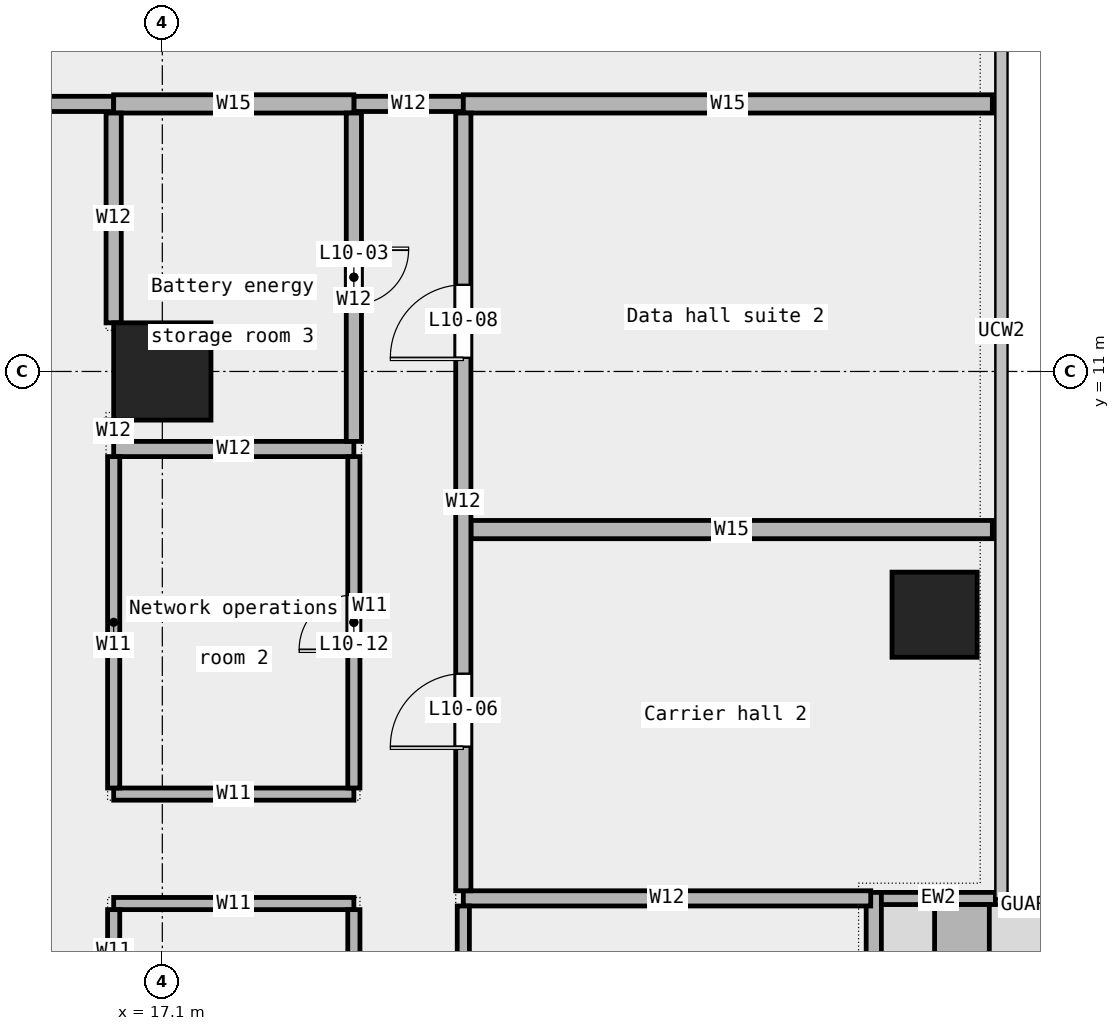
"""IFC4 building model, lengths in metres.
Left out: names, types, materials, properties, quantities, classifications, styles, units other than length and angle.
Written with IfcOpenShell. Run it as: python <this file> out.ifc"""

import sys

from ifc_helpers import new_model, si_unit, direction, frame, frame_2d, origin, origin_2d, place, context, subcontext, project, spatial, rectangle, extrude, element, fill, save


model = new_model("IFC4")
c1 = context("Model", 3, precision=1e-05, world=origin(), true_north=direction((0.0, 1.0)))
c2 = subcontext(c1, "Body", "Model", "MODEL_VIEW")
j1 = project(units=[si_unit("LENGTHUNIT", "METRE"), si_unit("PLANEANGLEUNIT", "RADIAN")], contexts=[c1])
p1 = place(None, origin())
s1 = spatial("IfcSite", under=j1, at=p1, CompositionType="ELEMENT")
p2 = place(p1, origin())
s2 = spatial("IfcBuilding", under=s1, at=p2, CompositionType="ELEMENT")
p3 = place(p2, frame((0.0, 0.0, 55.0)))
s3 = spatial("IfcBuildingStorey", under=s2, at=p3, CompositionType="ELEMENT", Elevation=55.0)
p4 = place(p3, frame((29.8, 7.0, 0.0), z_axis=(0.0, 0.0, 1.0), x_axis=(1.0, 0.0, 0.0)))
e1 = element("IfcColumn", 1, at=p4, inside=s3, PredefinedType="COLUMN", context=c2, shape_type="SweptSolid", body=[
    extrude(rectangle(XDim=1.4, YDim=1.4, at=origin_2d()), origin(), (0.0, 0.0, 1.0), 4.35),
])
p5 = place(p3, frame((17.1, 11.0, 0.0), z_axis=(0.0, 0.0, 1.0), x_axis=(1.0, 0.0, 0.0)))
e2 = element("IfcColumn", 2, at=p5, inside=s3, PredefinedType="COLUMN", context=c2, shape_type="SweptSolid", body=[
    extrude(rectangle(XDim=1.6, YDim=1.6, at=origin_2d()), origin(), (0.0, 0.0, 1.0), 4.35),
])
p6 = place(p3, frame((28.8, -11.767, 0.0), z_axis=(0.0, 0.0, 1.0), x_axis=(0.0, 1.0, 0.0)))
e3 = element("IfcWall", 3, at=p6, inside=s3, PredefinedType="STANDARD", context=c2, shape_type="SweptSolid", body=[
    extrude(rectangle(XDim=14.2, YDim=0.25, at=frame_2d((7.1, 0.0))), origin(), (0.0, 0.0, 1.0), 4.35),
])
p7 = place(p6, frame((1.75, 0.0, 0.45)))
e4 = element("IfcOpeningElement", 4, at=p7, cuts=e3, PredefinedType="OPENING", context=c2, shape_type="SweptSolid", body=[
    extrude(rectangle(XDim=1.5, YDim=3.0, at=frame_2d((0.75, 1.5))), frame((0.0, 0.137, 0.0), z_axis=(0.0, -1.0, 0.0), x_axis=(1.0, 0.0, 0.0)), (0.0, 0.0, 1.0), 0.274),
])
p8 = place(p6, frame((6.25, 0.0, 0.0)))
e5 = element("IfcOpeningElement", 5, at=p8, cuts=e3, PredefinedType="OPENING", context=c2, shape_type="SweptSolid", body=[
    extrude(rectangle(XDim=1.8, YDim=2.4, at=frame_2d((0.9, 1.2))), frame((0.0, 0.137, 0.0), z_axis=(0.0, -1.0, 0.0), x_axis=(1.0, 0.0, 0.0)), (0.0, 0.0, 1.0), 0.274),
])
p9 = place(p6, frame((11.0, 0.0, 0.45)))
e6 = element("IfcOpeningElement", 6, at=p9, cuts=e3, PredefinedType="OPENING", context=c2, shape_type="SweptSolid", body=[
    extrude(rectangle(XDim=1.5, YDim=3.0, at=frame_2d((0.75, 1.5))), frame((0.0, 0.137, 0.0), z_axis=(0.0, -1.0, 0.0), x_axis=(1.0, 0.0, 0.0)), (0.0, 0.0, 1.0), 0.274),
])
p10 = place(p3, frame((30.8, 2.333, 0.0), z_axis=(0.0, 0.0, 1.0), x_axis=(-1.0, 0.0, 0.0)))
e7 = element("IfcWall", 7, at=p10, inside=s3, PredefinedType="STANDARD", context=c2, shape_type="SweptSolid", body=[
    extrude(rectangle(XDim=1.875, YDim=0.2, at=frame_2d((0.938, 0.0))), origin(), (0.0, 0.0, 1.0), 4.35),
])
p11 = place(p3, frame((30.25, -1.367, 0.0), z_axis=(0.0, 0.0, 1.0), x_axis=(0.0, 1.0, 0.0)))
e8 = element("IfcWall", 8, at=p11, inside=s3, PredefinedType="STANDARD", context=c2, shape_type="SweptSolid", body=[
    extrude(rectangle(XDim=3.6, YDim=0.9, at=frame_2d((1.8, 0.0))), origin(), (0.0, 0.0, 1.0), 0.7),
])
p12 = place(p3, frame((16.3, 2.25, 0.0), z_axis=(0.0, 0.0, 1.0), x_axis=(1.0, 0.0, 0.0)))
e9 = element("IfcWall", 9, at=p12, inside=s3, PredefinedType="PARTITIONING", context=c2, shape_type="SweptSolid", body=[
    extrude(rectangle(XDim=3.95, YDim=0.2, at=frame_2d((1.975, 0.0))), origin(), (0.0, 0.0, 1.0), 4.35),
])
p13 = place(p3, frame((22.05, 2.335, 0.0), z_axis=(0.0, 0.0, 1.0), x_axis=(1.0, 0.0, 0.0)))
e10 = element("IfcWall", 10, at=p13, inside=s3, PredefinedType="PARTITIONING", context=c2, shape_type="SweptSolid", body=[
    extrude(rectangle(XDim=6.7, YDim=0.25, at=frame_2d((3.35, 0.0))), origin(), (0.0, 0.0, 1.0), 4.35),
])
p14 = place(p3, frame((16.3, 4.05, 0.0), z_axis=(0.0, 0.0, 1.0), x_axis=(1.0, 0.0, 0.0)))
e11 = element("IfcWall", 11, at=p14, inside=s3, PredefinedType="PARTITIONING", context=c2, shape_type="SweptSolid", body=[
    extrude(rectangle(XDim=3.95, YDim=0.2, at=frame_2d((1.975, 0.0))), origin(), (0.0, 0.0, 1.0), 4.35),
])
p15 = place(p3, frame((22.175, 8.4, 0.0), z_axis=(0.0, 0.0, 1.0), x_axis=(1.0, 0.0, 0.0)))
e12 = element("IfcWall", 12, at=p15, inside=s3, PredefinedType="PARTITIONING", context=c2, shape_type="SweptSolid", body=[
    extrude(rectangle(XDim=8.575, YDim=0.3, at=frame_2d((4.288, 0.0))), origin(), (0.0, 0.0, 1.0), 4.35),
])
p16 = place(p3, frame((16.3, 9.725, 0.0), z_axis=(0.0, 0.0, 1.0), x_axis=(1.0, 0.0, 0.0)))
e13 = element("IfcWall", 13, at=p16, inside=s3, PredefinedType="PARTITIONING", context=c2, shape_type="SweptSolid", body=[
    extrude(rectangle(XDim=3.95, YDim=0.25, at=frame_2d((1.975, 0.0))), origin(), (0.0, 0.0, 1.0), 4.35),
])
p17 = place(p3, frame((6.765, 15.4, 0.0), z_axis=(0.0, 0.0, 1.0), x_axis=(1.0, 0.0, 0.0)))
e14 = element("IfcWall", 14, at=p17, inside=s3, PredefinedType="PARTITIONING", context=c2, shape_type="SweptSolid", body=[
    extrude(rectangle(XDim=9.535, YDim=0.25, at=frame_2d((4.768, 0.0))), origin(), (0.0, 0.0, 1.0), 4.35),
])
p18 = place(p17, frame((3.867, 0.0, 0.0)))
e15 = element("IfcOpeningElement", 15, at=p18, cuts=e14, PredefinedType="OPENING", context=c2, shape_type="SweptSolid", body=[
    extrude(rectangle(XDim=1.8, YDim=2.1, at=frame_2d((0.9, 1.05))), frame((0.0, 0.137, 0.0), z_axis=(0.0, -1.0, 0.0), x_axis=(1.0, 0.0, 0.0)), (0.0, 0.0, 1.0), 0.274),
])
p19 = place(p3, frame((20.25, 15.4, 0.0), z_axis=(0.0, 0.0, 1.0), x_axis=(1.0, 0.0, 0.0)))
e16 = element("IfcWall", 16, at=p19, inside=s3, PredefinedType="PARTITIONING", context=c2, shape_type="SweptSolid", body=[
    extrude(rectangle(XDim=1.8, YDim=0.25, at=frame_2d((0.9, 0.0))), origin(), (0.0, 0.0, 1.0), 4.35),
])
p20 = place(p3, frame((16.3, 15.4, 0.0), z_axis=(0.0, 0.0, 1.0), x_axis=(1.0, 0.0, 0.0)))
e17 = element("IfcWall", 17, at=p20, inside=s3, PredefinedType="PARTITIONING", context=c2, shape_type="SweptSolid", body=[
    extrude(rectangle(XDim=3.95, YDim=0.3, at=frame_2d((1.975, 0.0))), origin(), (0.0, 0.0, 1.0), 4.35),
])
p21 = place(p3, frame((22.05, 15.4, 0.0), z_axis=(0.0, 0.0, 1.0), x_axis=(1.0, 0.0, 0.0)))
e18 = element("IfcWall", 18, at=p21, inside=s3, PredefinedType="PARTITIONING", context=c2, shape_type="SweptSolid", body=[
    extrude(rectangle(XDim=8.7, YDim=0.3, at=frame_2d((4.35, 0.0))), origin(), (0.0, 0.0, 1.0), 4.35),
])
p22 = place(p3, frame((16.3, 0.8, 0.0), z_axis=(0.0, 0.0, 1.0), x_axis=(0.0, 1.0, 0.0)))
e19 = element("IfcWall", 19, at=p22, inside=s3, PredefinedType="PARTITIONING", context=c2, shape_type="SweptSolid", body=[
    extrude(rectangle(XDim=1.35, YDim=0.2, at=frame_2d((0.675, 0.0))), origin(), (0.0, 0.0, 1.0), 4.35),
])
p23 = place(p3, frame((16.3, 4.15, 0.0), z_axis=(0.0, 0.0, 1.0), x_axis=(0.0, 1.0, 0.0)))
e20 = element("IfcWall", 20, at=p23, inside=s3, PredefinedType="PARTITIONING", context=c2, shape_type="SweptSolid", body=[
    extrude(rectangle(XDim=5.45, YDim=0.2, at=frame_2d((2.725, 0.0))), origin(), (0.0, 0.0, 1.0), 4.35),
])
p24 = place(p3, frame((16.3, 9.85, 0.0), z_axis=(0.0, 0.0, 1.0), x_axis=(0.0, 1.0, 0.0)))
e21 = element("IfcWall", 21, at=p24, inside=s3, PredefinedType="PARTITIONING", context=c2, shape_type="SweptSolid", body=[
    extrude(rectangle(XDim=0.35, YDim=0.25, at=frame_2d((0.175, 0.0))), origin(), (0.0, 0.0, 1.0), 4.35),
])
p25 = place(p3, frame((16.3, 11.8, 0.0), z_axis=(0.0, 0.0, 1.0), x_axis=(0.0, 1.0, 0.0)))
e22 = element("IfcWall", 22, at=p25, inside=s3, PredefinedType="PARTITIONING", context=c2, shape_type="SweptSolid", body=[
    extrude(rectangle(XDim=3.45, YDim=0.25, at=frame_2d((1.725, 0.0))), origin(), (0.0, 0.0, 1.0), 4.35),
])
p26 = place(p3, frame((20.25, -9.0, 0.0), z_axis=(0.0, 0.0, 1.0), x_axis=(0.0, 1.0, 0.0)))
e23 = element("IfcWall", 23, at=p26, inside=s3, PredefinedType="PARTITIONING", context=c2, shape_type="SweptSolid", body=[
    extrude(rectangle(XDim=11.15, YDim=0.2, at=frame_2d((5.575, 0.0))), origin(), (0.0, 0.0, 1.0), 4.35),
])
p27 = place(p3, frame((20.25, 4.15, 0.0), z_axis=(0.0, 0.0, 1.0), x_axis=(0.0, 1.0, 0.0)))
e24 = element("IfcWall", 24, at=p27, inside=s3, PredefinedType="PARTITIONING", context=c2, shape_type="SweptSolid", body=[
    extrude(rectangle(XDim=5.45, YDim=0.2, at=frame_2d((2.725, 0.0))), origin(), (0.0, 0.0, 1.0), 4.35),
])
p28 = place(p27, frame((2.275, 0.0, 0.0)))
e25 = element("IfcOpeningElement", 25, at=p28, cuts=e24, PredefinedType="OPENING", context=c2, shape_type="SweptSolid", body=[
    extrude(rectangle(XDim=0.9, YDim=2.1, at=frame_2d((0.45, 1.05))), frame((0.0, 0.112, 0.0), z_axis=(0.0, -1.0, 0.0), x_axis=(1.0, 0.0, 0.0)), (0.0, 0.0, 1.0), 0.224),
])
p29 = place(p3, frame((20.25, 9.85, 0.0), z_axis=(0.0, 0.0, 1.0), x_axis=(0.0, 1.0, 0.0)))
e26 = element("IfcWall", 26, at=p29, inside=s3, PredefinedType="PARTITIONING", context=c2, shape_type="SweptSolid", body=[
    extrude(rectangle(XDim=5.4, YDim=0.25, at=frame_2d((2.7, 0.0))), origin(), (0.0, 0.0, 1.0), 4.35),
])
p30 = place(p29, frame((2.25, 0.0, 0.0)))
e27 = element("IfcOpeningElement", 27, at=p30, cuts=e26, PredefinedType="OPENING", context=c2, shape_type="SweptSolid", body=[
    extrude(rectangle(XDim=0.9, YDim=2.1, at=frame_2d((0.45, 1.05))), frame((0.0, 0.137, 0.0), z_axis=(0.0, -1.0, 0.0), x_axis=(1.0, 0.0, 0.0)), (0.0, 0.0, 1.0), 0.274),
])
p31 = place(p3, frame((22.05, -9.0, 0.0), z_axis=(0.0, 0.0, 1.0), x_axis=(0.0, 1.0, 0.0)))
e28 = element("IfcWall", 28, at=p31, inside=s3, PredefinedType="PARTITIONING", context=c2, shape_type="SweptSolid", body=[
    extrude(rectangle(XDim=11.21, YDim=0.2, at=frame_2d((5.605, 0.0))), origin(), (0.0, 0.0, 1.0), 4.35),
])
p32 = place(p31, frame((4.705, 0.0, 0.0)))
e29 = element("IfcOpeningElement", 29, at=p32, cuts=e28, PredefinedType="OPENING", context=c2, shape_type="SweptSolid", body=[
    extrude(rectangle(XDim=1.8, YDim=2.1, at=frame_2d((0.9, 1.05))), frame((0.0, 0.112, 0.0), z_axis=(0.0, -1.0, 0.0), x_axis=(1.0, 0.0, 0.0)), (0.0, 0.0, 1.0), 0.224),
])
p33 = place(p3, frame((22.05, 2.46, 0.0), z_axis=(0.0, 0.0, 1.0), x_axis=(0.0, 1.0, 0.0)))
e30 = element("IfcWall", 30, at=p33, inside=s3, PredefinedType="PARTITIONING", context=c2, shape_type="SweptSolid", body=[
    extrude(rectangle(XDim=12.79, YDim=0.25, at=frame_2d((6.395, 0.0))), origin(), (0.0, 0.0, 1.0), 4.35),
])
p34 = place(p33, frame((2.37, 0.0, 0.0)))
e31 = element("IfcOpeningElement", 31, at=p34, cuts=e30, PredefinedType="OPENING", context=c2, shape_type="SweptSolid", body=[
    extrude(rectangle(XDim=1.2, YDim=2.1, at=frame_2d((0.6, 1.05))), frame((0.0, 0.137, 0.0), z_axis=(0.0, -1.0, 0.0), x_axis=(1.0, 0.0, 0.0)), (0.0, 0.0, 1.0), 0.274),
])
p35 = place(p33, frame((8.765, 0.0, 0.0)))
e32 = element("IfcOpeningElement", 32, at=p35, cuts=e30, PredefinedType="OPENING", context=c2, shape_type="SweptSolid", body=[
    extrude(rectangle(XDim=1.2, YDim=2.1, at=frame_2d((0.6, 1.05))), frame((0.0, 0.137, 0.0), z_axis=(0.0, -1.0, 0.0), x_axis=(1.0, 0.0, 0.0)), (0.0, 0.0, 1.0), 0.274),
])
p36 = place(p30, origin())
e33 = element("IfcDoor", 33, at=p36, inside=s3, OperationType="SINGLE_SWING_LEFT", PredefinedType="DOOR", context=c2, shape_type="SweptSolid", body=[
    extrude(rectangle(XDim=0.9, YDim=2.1, at=frame_2d((0.45, 1.05))), frame((0.0, 0.025, 0.0), z_axis=(0.0, -1.0, 0.0), x_axis=(1.0, 0.0, 0.0)), (0.0, 0.0, 1.0), 0.05),
])
fill(e27, e33)
p37 = place(p34, origin())
e34 = element("IfcDoor", 34, at=p37, inside=s3, OperationType="SINGLE_SWING_LEFT", PredefinedType="DOOR", context=c2, shape_type="SweptSolid", body=[
    extrude(rectangle(XDim=1.2, YDim=2.1, at=frame_2d((0.6, 1.05))), frame((0.0, 0.025, 0.0), z_axis=(0.0, -1.0, 0.0), x_axis=(1.0, 0.0, 0.0)), (0.0, 0.0, 1.0), 0.05),
])
fill(e31, e34)
p38 = place(p35, origin())
e35 = element("IfcDoor", 35, at=p38, inside=s3, OperationType="SINGLE_SWING_LEFT", PredefinedType="DOOR", context=c2, shape_type="SweptSolid", body=[
    extrude(rectangle(XDim=1.2, YDim=2.1, at=frame_2d((0.6, 1.05))), frame((0.0, 0.025, 0.0), z_axis=(0.0, -1.0, 0.0), x_axis=(1.0, 0.0, 0.0)), (0.0, 0.0, 1.0), 0.05),
])
fill(e32, e35)
p39 = place(p28, origin())
e36 = element("IfcDoor", 36, at=p39, inside=s3, OperationType="SINGLE_SWING_LEFT", PredefinedType="DOOR", context=c2, shape_type="SweptSolid", body=[
    extrude(rectangle(XDim=0.9, YDim=2.1, at=frame_2d((0.45, 1.05))), frame((0.0, 0.025, 0.0), z_axis=(0.0, -1.0, 0.0), x_axis=(1.0, 0.0, 0.0)), (0.0, 0.0, 1.0), 0.05),
])
fill(e25, e36)
save(model, sys.argv[1])
